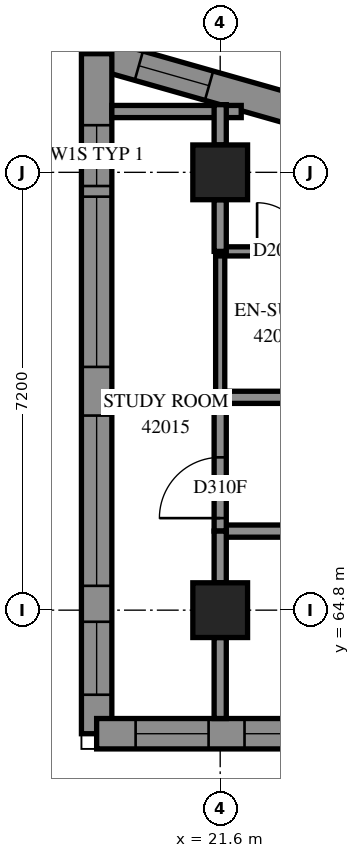
"""IFC4 building model, lengths in metres.
Left out: names, types, materials, properties, quantities, classifications, styles, units other than length and angle.
Written with IfcOpenShell. Run it as: python <this file> out.ifc"""

import sys

from ifc_helpers import new_model, si_unit, direction, frame, frame_2d, origin, origin_2d, place, context, subcontext, project, spatial, polyline, rectangle, outline, extrude, element, fill, save


model = new_model("IFC4")
c1 = context("Model", 3, precision=1e-05, world=origin(), true_north=direction((0.0, 1.0)))
c2 = subcontext(c1, "Body", "Model", "MODEL_VIEW")
j1 = project(units=[si_unit("LENGTHUNIT", "METRE"), si_unit("PLANEANGLEUNIT", "RADIAN")], contexts=[c1])
p1 = place(None, origin())
s1 = spatial("IfcSite", under=j1, at=p1, CompositionType="ELEMENT")
p2 = place(p1, origin())
s2 = spatial("IfcBuilding", under=s1, at=p2, CompositionType="ELEMENT")
p3 = place(p2, frame((0.0, 0.0, 155.8)))
s3 = spatial("IfcBuildingStorey", under=s2, at=p3, CompositionType="ELEMENT", Elevation=155.8)
for number, where, z_axis, x_axis in (
    (1, (21.6, 64.8, 0.0), (0.0, 0.0, 1.0), (1.0, 0.0, 0.0)),
    (2, (21.6, 72.0, 0.0), (0.0, 0.0, 1.0), (1.0, 0.0, 0.0)),
):
    element("IfcColumn", number, at=place(p3, frame(where, z_axis=z_axis, x_axis=x_axis)), inside=s3, PredefinedType="COLUMN", context=c2, shape_type="SweptSolid", body=[
        extrude(rectangle(XDim=0.9, YDim=0.9, at=origin_2d()), origin(), (0.0, 0.0, 1.0), 3.1),
    ])
p4 = place(p3, frame((23.1, 72.946, 0.0), z_axis=(0.0, 0.0, 1.0), x_axis=(-0.9618080431, 0.2737248403, 0.0)))
e3 = element("IfcWall", 3, at=p4, inside=s3, PredefinedType="SOLIDWALL", context=c2, shape_type="SweptSolid", body=[
    extrude(outline(polyline([(0.051, -0.25), (4.004, -0.25), (3.342, 0.25), (-0.051, 0.25), (0.051, -0.25)])), origin(), (0.0, 0.0, 1.0), 3.1),
])
p5 = place(p4, frame((1.751, 0.0, 0.45)))
e4 = element("IfcOpeningElement", 4, at=p5, cuts=e3, PredefinedType="OPENING", context=c2, shape_type="SweptSolid", body=[
    extrude(rectangle(XDim=1.2, YDim=2.5, at=frame_2d((0.6, 1.25))), frame((0.0, 0.26, 0.0), z_axis=(0.0, -1.0, 0.0), x_axis=(1.0, 0.0, 0.0)), (0.0, 0.0, 1.0), 0.52),
])
p6 = place(p3, frame((19.568, 73.951, 0.0), z_axis=(0.0, 0.0, 1.0), x_axis=(0.0, -1.0, 0.0)))
e5 = element("IfcWall", 5, at=p6, inside=s3, PredefinedType="SOLIDWALL", context=c2, shape_type="SweptSolid", body=[
    extrude(outline(polyline([(-0.331, -0.25), (11.433, -0.25), (10.933, 0.25), (0.331, 0.25), (-0.331, -0.25)])), origin(), (0.0, 0.0, 1.0), 3.1),
])
p7 = place(p6, frame((2.351, 0.0, 0.45)))
e6 = element("IfcOpeningElement", 6, at=p7, cuts=e5, PredefinedType="OPENING", context=c2, shape_type="SweptSolid", body=[
    extrude(rectangle(XDim=2.8, YDim=2.5, at=frame_2d((1.4, 1.25))), frame((0.0, 0.26, 0.0), z_axis=(0.0, -1.0, 0.0), x_axis=(1.0, 0.0, 0.0)), (0.0, 0.0, 1.0), 0.52),
])
p8 = place(p6, frame((5.951, 0.0, 0.45)))
e7 = element("IfcOpeningElement", 7, at=p8, cuts=e5, PredefinedType="OPENING", context=c2, shape_type="SweptSolid", body=[
    extrude(rectangle(XDim=2.8, YDim=2.5, at=frame_2d((1.4, 1.25))), frame((0.0, 0.26, 0.0), z_axis=(0.0, -1.0, 0.0), x_axis=(1.0, 0.0, 0.0)), (0.0, 0.0, 1.0), 0.52),
])
p9 = place(p6, frame((9.342, 0.0, 0.45)))
e8 = element("IfcOpeningElement", 8, at=p9, cuts=e5, PredefinedType="OPENING", context=c2, shape_type="SweptSolid", body=[
    extrude(rectangle(XDim=1.2, YDim=2.5, at=frame_2d((0.6, 1.25))), frame((0.0, 0.26, 0.0), z_axis=(0.0, -1.0, 0.0), x_axis=(1.0, 0.0, 0.0)), (0.0, 0.0, 1.0), 0.52),
])
p10 = place(p6, frame((1.176, 0.0, 0.45)))
e9 = element("IfcOpeningElement", 9, at=p10, cuts=e5, PredefinedType="OPENING", context=c2, shape_type="SweptSolid", body=[
    extrude(rectangle(XDim=1.0, YDim=2.5, at=frame_2d((0.5, 1.25))), frame((0.0, 0.26, 0.0), z_axis=(0.0, -1.0, 0.0), x_axis=(1.0, 0.0, 0.0)), (0.0, 0.0, 1.0), 0.52),
])
p11 = place(p3, frame((19.568, 62.768, 0.0), z_axis=(0.0, 0.0, 1.0), x_axis=(1.0, 0.0, 0.0)))
e10 = element("IfcWall", 10, at=p11, inside=s3, PredefinedType="SOLIDWALL", context=c2, shape_type="SweptSolid", body=[
    extrude(outline(polyline([(-0.25, -0.25), (15.232, -0.25), (15.732, 0.25), (0.25, 0.25), (-0.25, -0.25)])), origin(), (0.0, 0.0, 1.0), 3.1),
])
p12 = place(p11, frame((2.432, 0.0, 0.45)))
e11 = element("IfcOpeningElement", 11, at=p12, cuts=e10, PredefinedType="OPENING", context=c2, shape_type="SweptSolid", body=[
    extrude(rectangle(XDim=2.8, YDim=2.5, at=frame_2d((1.4, 1.25))), frame((0.0, 0.26, 0.0), z_axis=(0.0, -1.0, 0.0), x_axis=(1.0, 0.0, 0.0)), (0.0, 0.0, 1.0), 0.52),
])
p13 = place(p11, frame((6.032, 0.0, 0.45)))
e12 = element("IfcOpeningElement", 12, at=p13, cuts=e10, PredefinedType="OPENING", context=c2, shape_type="SweptSolid", body=[
    extrude(rectangle(XDim=2.8, YDim=2.5, at=frame_2d((1.4, 1.25))), frame((0.0, 0.26, 0.0), z_axis=(0.0, -1.0, 0.0), x_axis=(1.0, 0.0, 0.0)), (0.0, 0.0, 1.0), 0.52),
])
p14 = place(p11, frame((9.382, 0.0, 0.45)))
e13 = element("IfcOpeningElement", 13, at=p14, cuts=e10, PredefinedType="OPENING", context=c2, shape_type="SweptSolid", body=[
    extrude(rectangle(XDim=2.8, YDim=2.5, at=frame_2d((1.4, 1.25))), frame((0.0, 0.26, 0.0), z_axis=(0.0, -1.0, 0.0), x_axis=(1.0, 0.0, 0.0)), (0.0, 0.0, 1.0), 0.52),
])
p15 = place(p11, frame((0.641, 0.0, 0.45)))
e14 = element("IfcOpeningElement", 14, at=p15, cuts=e10, PredefinedType="OPENING", context=c2, shape_type="SweptSolid", body=[
    extrude(rectangle(XDim=1.2, YDim=2.5, at=frame_2d((0.6, 1.25))), frame((0.0, 0.26, 0.0), z_axis=(0.0, -1.0, 0.0), x_axis=(1.0, 0.0, 0.0)), (0.0, 0.0, 1.0), 0.52),
])
p16 = place(p11, frame((13.457, 0.0, 0.45)))
e15 = element("IfcOpeningElement", 15, at=p16, cuts=e10, PredefinedType="OPENING", context=c2, shape_type="SweptSolid", body=[
    extrude(rectangle(XDim=1.2, YDim=2.5, at=frame_2d((0.6, 1.25))), frame((0.0, 0.26, 0.0), z_axis=(0.0, -1.0, 0.0), x_axis=(1.0, 0.0, 0.0)), (0.0, 0.0, 1.0), 0.52),
])
p17 = place(p3, frame((21.6, 68.3, 0.0), z_axis=(0.0, 0.0, 1.0), x_axis=(1.0, 0.0, 0.0)))
e16 = element("IfcWall", 16, at=p17, inside=s3, PredefinedType="PARTITIONING", context=c2, shape_type="SweptSolid", body=[
    extrude(rectangle(XDim=19.1, YDim=0.2, at=frame_2d((9.55, 0.0))), origin(), (0.0, 0.0, 1.0), 3.1),
])
p18 = place(p17, frame((3.899, 0.0, 0.0)))
e17 = element("IfcOpeningElement", 17, at=p18, cuts=e16, PredefinedType="OPENING", context=c2, shape_type="SweptSolid", body=[
    extrude(rectangle(XDim=0.9, YDim=2.1, at=frame_2d((0.45, 1.05))), frame((0.0, 0.11, 0.0), z_axis=(0.0, -1.0, 0.0), x_axis=(1.0, 0.0, 0.0)), (0.0, 0.0, 1.0), 0.22),
])
p19 = place(p17, frame((11.099, 0.0, 0.0)))
e18 = element("IfcOpeningElement", 18, at=p19, cuts=e16, PredefinedType="OPENING", context=c2, shape_type="SweptSolid", body=[
    extrude(rectangle(XDim=0.9, YDim=2.1, at=frame_2d((0.45, 1.05))), frame((0.0, 0.11, 0.0), z_axis=(0.0, -1.0, 0.0), x_axis=(1.0, 0.0, 0.0)), (0.0, 0.0, 1.0), 0.22),
])
p20 = place(p17, frame((16.7, 0.0, 0.0)))
e19 = element("IfcOpeningElement", 19, at=p20, cuts=e16, PredefinedType="OPENING", context=c2, shape_type="SweptSolid", body=[
    extrude(rectangle(XDim=0.9, YDim=2.1, at=frame_2d((0.45, 1.05))), frame((0.0, 0.11, 0.0), z_axis=(0.0, -1.0, 0.0), x_axis=(1.0, 0.0, 0.0)), (0.0, 0.0, 1.0), 0.22),
])
p21 = place(p3, frame((21.6, 66.1, 0.0), z_axis=(0.0, 0.0, 1.0), x_axis=(1.0, 0.0, 0.0)))
e20 = element("IfcWall", 20, at=p21, inside=s3, PredefinedType="PARTITIONING", context=c2, shape_type="SweptSolid", body=[
    extrude(rectangle(XDim=16.9, YDim=0.2, at=frame_2d((8.45, 0.0))), origin(), (0.0, 0.0, 1.0), 3.1),
])
p22 = place(p21, frame((12.493, 0.0, 0.0)))
e21 = element("IfcOpeningElement", 21, at=p22, cuts=e20, PredefinedType="OPENING", context=c2, shape_type="SweptSolid", body=[
    extrude(rectangle(XDim=1.0, YDim=2.1, at=frame_2d((0.5, 1.05))), frame((0.0, 0.11, 0.0), z_axis=(0.0, -1.0, 0.0), x_axis=(1.0, 0.0, 0.0)), (0.0, 0.0, 1.0), 0.22),
])
p23 = place(p3, frame((21.6, 68.3, 0.0), z_axis=(0.0, 0.0, 1.0), x_axis=(0.0, 1.0, 0.0)))
e22 = element("IfcWall", 22, at=p23, inside=s3, PredefinedType="PARTITIONING", context=c2, shape_type="SweptSolid", body=[
    extrude(rectangle(XDim=2.4, YDim=0.15, at=frame_2d((1.2, 0.0))), origin(), (0.0, 0.0, 1.0), 2.6),
])
p24 = place(p3, frame((21.6, 66.1, 0.0), z_axis=(0.0, 0.0, 1.0), x_axis=(0.0, 1.0, 0.0)))
e23 = element("IfcWall", 23, at=p24, inside=s3, PredefinedType="PARTITIONING", context=c2, shape_type="SweptSolid", body=[
    extrude(rectangle(XDim=2.2, YDim=0.2, at=frame_2d((1.1, 0.0))), origin(), (0.0, 0.0, 1.0), 2.6),
])
p25 = place(p24, frame((0.213, 0.0, 0.0)))
e24 = element("IfcOpeningElement", 24, at=p25, cuts=e23, PredefinedType="OPENING", context=c2, shape_type="SweptSolid", body=[
    extrude(rectangle(XDim=1.0, YDim=2.1, at=frame_2d((0.5, 1.05))), frame((0.0, 0.11, 0.0), z_axis=(0.0, -1.0, 0.0), x_axis=(1.0, 0.0, 0.0)), (0.0, 0.0, 1.0), 0.22),
])
p26 = place(p3, frame((19.818, 73.0, 0.0), z_axis=(0.0, 0.0, 1.0), x_axis=(1.0, 0.0, 0.0)))
e25 = element("IfcWall", 25, at=p26, inside=s3, PredefinedType="PARTITIONING", context=c2, shape_type="SweptSolid", body=[
    extrude(rectangle(XDim=2.128, YDim=0.2, at=frame_2d((1.064, 0.0))), origin(), (0.0, 0.0, 1.0), 3.1),
])
p27 = place(p3, frame((21.6, 70.7, 0.0), z_axis=(0.0, 0.0, 1.0), x_axis=(1.0, 0.0, 0.0)))
e26 = element("IfcWall", 26, at=p27, inside=s3, PredefinedType="PARTITIONING", context=c2, shape_type="SweptSolid", body=[
    extrude(rectangle(XDim=1.9, YDim=0.15, at=frame_2d((0.95, 0.0))), origin(), (0.0, 0.0, 1.0), 3.1),
])
p28 = place(p27, frame((0.607, 0.0, 0.0)))
e27 = element("IfcOpeningElement", 27, at=p28, cuts=e26, PredefinedType="OPENING", context=c2, shape_type="SweptSolid", body=[
    extrude(rectangle(XDim=0.8, YDim=2.1, at=frame_2d((0.4, 1.05))), frame((0.0, 0.085, 0.0), z_axis=(0.0, -1.0, 0.0), x_axis=(1.0, 0.0, 0.0)), (0.0, 0.0, 1.0), 0.17),
])
p29 = place(p3, frame((21.6, 63.018, 0.0), z_axis=(0.0, 0.0, 1.0), x_axis=(0.0, 1.0, 0.0)))
e28 = element("IfcWall", 28, at=p29, inside=s3, PredefinedType="PARTITIONING", context=c2, shape_type="SweptSolid", body=[
    extrude(rectangle(XDim=1.332, YDim=0.2, at=frame_2d((0.666, 0.0))), origin(), (0.0, 0.0, 1.0), 3.1),
])
for number, where, z_axis, x_axis in (
    (29, (21.6, 65.25, 0.0), (0.0, 0.0, 1.0), (0.0, 1.0, 0.0)),
    (30, (21.6, 70.7, 0.0), (0.0, 0.0, 1.0), (0.0, 1.0, 0.0)),
):
    element("IfcWall", number, at=place(p3, frame(where, z_axis=z_axis, x_axis=x_axis)), inside=s3, PredefinedType="PARTITIONING", context=c2, shape_type="SweptSolid", body=[
        extrude(rectangle(XDim=0.85, YDim=0.2, at=frame_2d((0.425, 0.0))), origin(), (0.0, 0.0, 1.0), 2.6),
    ])
p30 = place(p3, frame((21.6, 72.45, 0.0), z_axis=(0.0, 0.0, 1.0), x_axis=(0.0, 1.0, 0.0)))
e31 = element("IfcWall", 31, at=p30, inside=s3, PredefinedType="PARTITIONING", context=c2, shape_type="SweptSolid", body=[
    extrude(rectangle(XDim=0.663, YDim=0.2, at=frame_2d((0.331, 0.0))), origin(), (0.0, 0.0, 1.0), 3.1),
])
p31 = place(p5, origin())
e32 = element("IfcWindow", 32, at=p31, inside=s3, PartitioningType="SINGLE_PANEL", PredefinedType="WINDOW", context=c2, shape_type="SweptSolid", body=[
    extrude(rectangle(XDim=1.2, YDim=2.5, at=frame_2d((0.6, 1.25))), frame((0.0, 0.18, 0.0), z_axis=(0.0, -1.0, 0.0), x_axis=(1.0, 0.0, 0.0)), (0.0, 0.0, 1.0), 0.06),
])
fill(e4, e32)
p32 = place(p7, origin())
e33 = element("IfcWindow", 33, at=p32, inside=s3, PartitioningType="SINGLE_PANEL", PredefinedType="WINDOW", context=c2, shape_type="SweptSolid", body=[
    extrude(rectangle(XDim=2.8, YDim=2.5, at=frame_2d((1.4, 1.25))), frame((0.0, 0.18, 0.0), z_axis=(0.0, -1.0, 0.0), x_axis=(1.0, 0.0, 0.0)), (0.0, 0.0, 1.0), 0.06),
])
fill(e6, e33)
p33 = place(p8, origin())
e34 = element("IfcWindow", 34, at=p33, inside=s3, PartitioningType="SINGLE_PANEL", PredefinedType="WINDOW", context=c2, shape_type="SweptSolid", body=[
    extrude(rectangle(XDim=2.8, YDim=2.5, at=frame_2d((1.4, 1.25))), frame((0.0, 0.18, 0.0), z_axis=(0.0, -1.0, 0.0), x_axis=(1.0, 0.0, 0.0)), (0.0, 0.0, 1.0), 0.06),
])
fill(e7, e34)
p34 = place(p9, origin())
e35 = element("IfcWindow", 35, at=p34, inside=s3, PartitioningType="SINGLE_PANEL", PredefinedType="WINDOW", context=c2, shape_type="SweptSolid", body=[
    extrude(rectangle(XDim=1.2, YDim=2.5, at=frame_2d((0.6, 1.25))), frame((0.0, 0.18, 0.0), z_axis=(0.0, -1.0, 0.0), x_axis=(1.0, 0.0, 0.0)), (0.0, 0.0, 1.0), 0.06),
])
fill(e8, e35)
p35 = place(p12, origin())
e36 = element("IfcWindow", 36, at=p35, inside=s3, PartitioningType="SINGLE_PANEL", PredefinedType="WINDOW", context=c2, shape_type="SweptSolid", body=[
    extrude(rectangle(XDim=2.8, YDim=2.5, at=frame_2d((1.4, 1.25))), frame((0.0, 0.18, 0.0), z_axis=(0.0, -1.0, 0.0), x_axis=(1.0, 0.0, 0.0)), (0.0, 0.0, 1.0), 0.06),
])
fill(e11, e36)
p36 = place(p15, origin())
e37 = element("IfcWindow", 37, at=p36, inside=s3, PartitioningType="SINGLE_PANEL", PredefinedType="WINDOW", context=c2, shape_type="SweptSolid", body=[
    extrude(rectangle(XDim=1.2, YDim=2.5, at=frame_2d((0.6, 1.25))), frame((0.0, 0.18, 0.0), z_axis=(0.0, -1.0, 0.0), x_axis=(1.0, 0.0, 0.0)), (0.0, 0.0, 1.0), 0.06),
])
fill(e14, e37)
p37 = place(p25, origin())
e38 = element("IfcDoor", 38, at=p37, inside=s3, OperationType="SINGLE_SWING_RIGHT", PredefinedType="DOOR", context=c2, shape_type="SweptSolid", body=[
    extrude(rectangle(XDim=1.0, YDim=2.1, at=frame_2d((0.5, 1.05))), frame((0.0, 0.025, 0.0), z_axis=(0.0, -1.0, 0.0), x_axis=(1.0, 0.0, 0.0)), (0.0, 0.0, 1.0), 0.05),
])
fill(e24, e38)
p38 = place(p28, origin())
e39 = element("IfcDoor", 39, at=p38, inside=s3, OperationType="SINGLE_SWING_RIGHT", PredefinedType="DOOR", context=c2, shape_type="SweptSolid", body=[
    extrude(rectangle(XDim=0.8, YDim=2.1, at=frame_2d((0.4, 1.05))), frame((0.0, 0.025, 0.0), z_axis=(0.0, -1.0, 0.0), x_axis=(1.0, 0.0, 0.0)), (0.0, 0.0, 1.0), 0.05),
])
fill(e27, e39)
p39 = place(p10, origin())
e40 = element("IfcWindow", 40, at=p39, inside=s3, PartitioningType="SINGLE_PANEL", PredefinedType="WINDOW", context=c2, shape_type="SweptSolid", body=[
    extrude(rectangle(XDim=1.0, YDim=2.5, at=frame_2d((0.5, 1.25))), frame((0.0, 0.18, 0.0), z_axis=(0.0, -1.0, 0.0), x_axis=(1.0, 0.0, 0.0)), (0.0, 0.0, 1.0), 0.06),
])
fill(e9, e40)
save(model, sys.argv[1])
